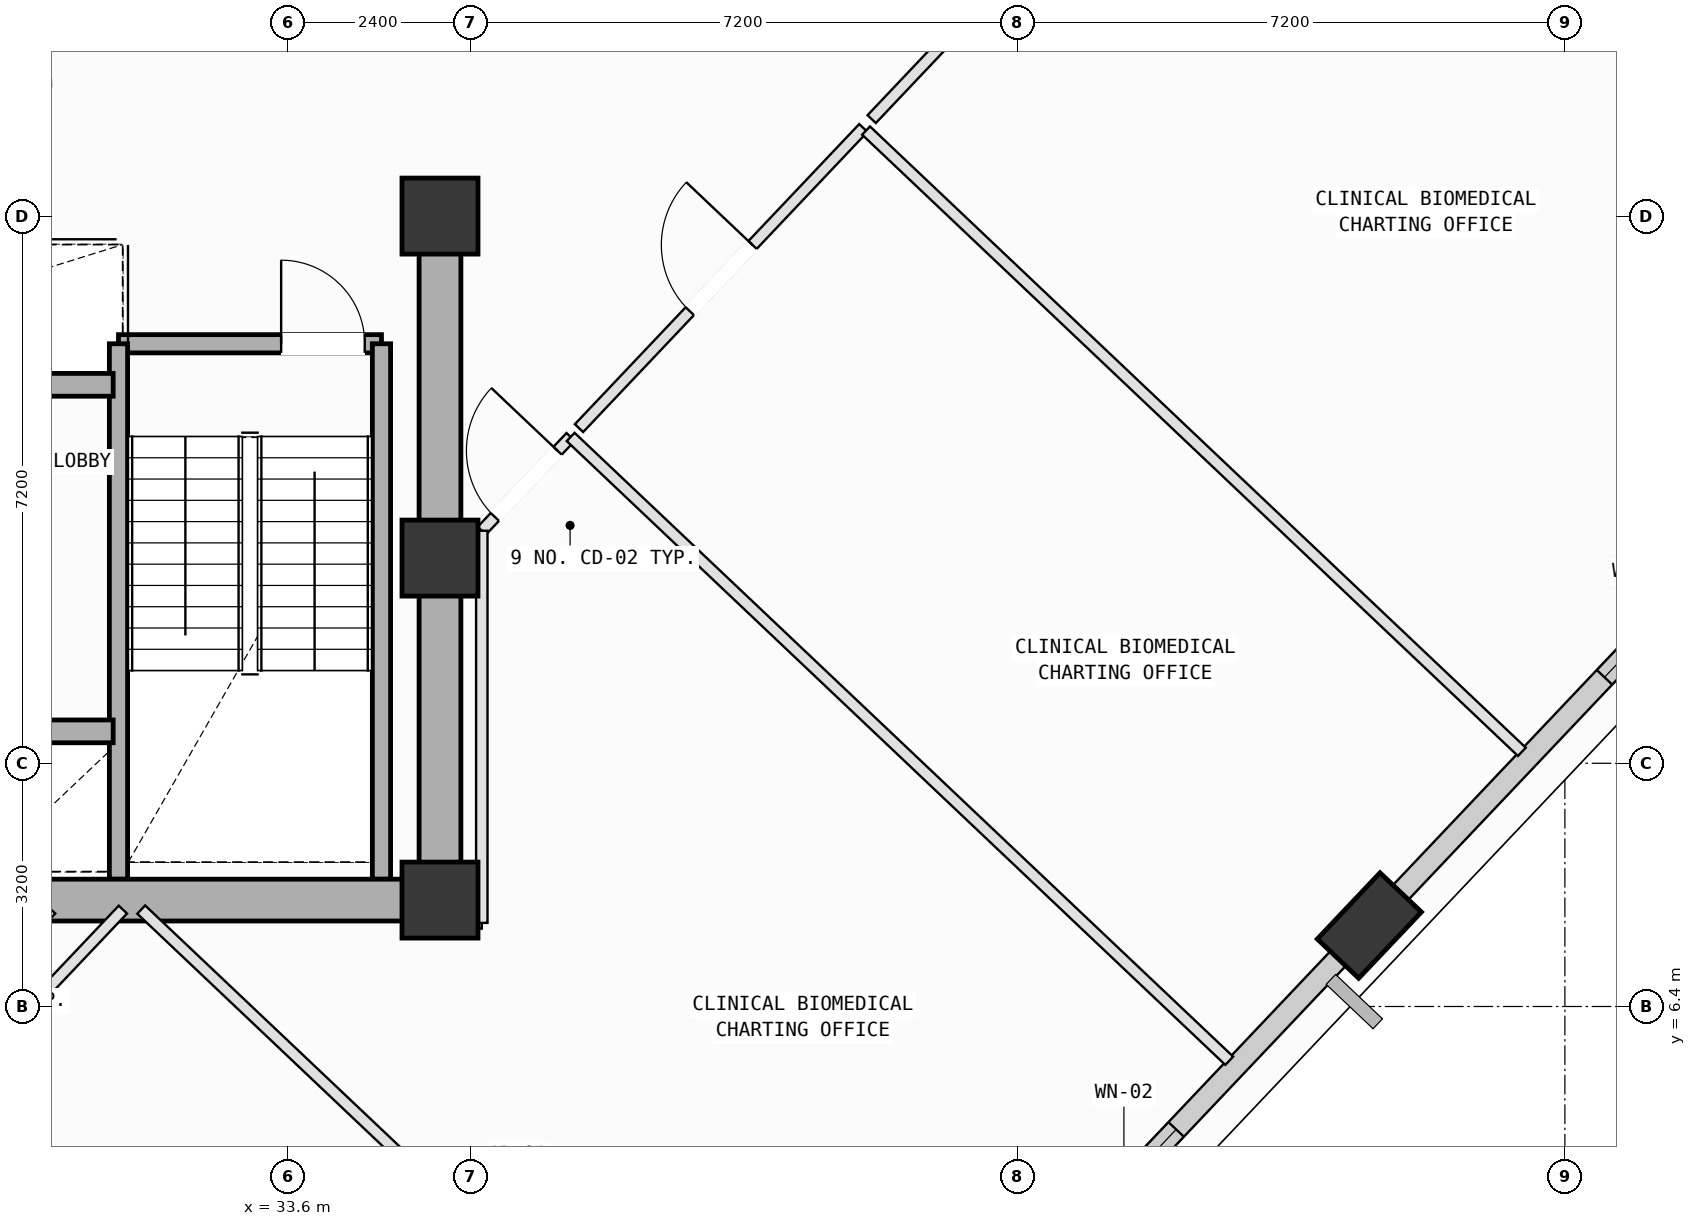
"""IFC4 building model, lengths in metres.
Left out: names, types, materials, properties, quantities, classifications, styles, units other than length and angle.
Written with IfcOpenShell. Run it as: python <this file> out.ifc"""

import sys

from ifc_helpers import new_model, si_unit, direction, frame, frame_2d, origin, origin_2d, place, context, subcontext, project, spatial, rectangle, extrude, element, fill, save


model = new_model("IFC4")
c1 = context("Model", 3, precision=1e-05, world=origin(), true_north=direction((0.0, 1.0)))
c2 = subcontext(c1, "Body", "Model", "MODEL_VIEW")
j1 = project(units=[si_unit("LENGTHUNIT", "METRE"), si_unit("PLANEANGLEUNIT", "RADIAN")], contexts=[c1])
p1 = place(None, origin())
s1 = spatial("IfcSite", under=j1, at=p1, CompositionType="ELEMENT")
p2 = place(p1, origin())
s2 = spatial("IfcBuilding", under=s1, at=p2, CompositionType="ELEMENT")
p3 = place(p2, frame((0.0, 0.0, 223.2)))
s3 = spatial("IfcBuildingStorey", under=s2, at=p3, CompositionType="ELEMENT", Elevation=223.2)
for number, where, z_axis, x_axis in (
    (1, (35.6, 7.8, 0.0), (0.0, 0.0, 1.0), (1.0, 0.0, 0.0)),
    (2, (35.6, 12.3, 0.0), (0.0, 0.0, 1.0), (1.0, 0.0, 0.0)),
    (3, (35.6, 16.8, 0.0), (0.0, 0.0, 1.0), (1.0, 0.0, 0.0)),
):
    element("IfcColumn", number, at=place(p3, frame(where, z_axis=z_axis, x_axis=x_axis)), inside=s3, PredefinedType="COLUMN", context=c2, shape_type="SweptSolid", body=[
        extrude(rectangle(XDim=1.0, YDim=1.0, at=origin_2d()), origin(), (0.0, 0.0, 1.0), 4.0),
    ])
p4 = place(p3, frame((47.827, 7.466, 0.002), z_axis=(0.071048146409, 0.059308170161, 0.995708140895), x_axis=(-0.995638946923, 0.064721230775, 0.067188166046)))
e4 = element("IfcColumn", 4, at=p4, inside=s3, PredefinedType="COLUMN", context=c2, shape_type="SweptSolid", body=[
    extrude(rectangle(XDim=1.2, YDim=0.75, at=origin_2d()), origin(), (0.0, 0.0, 1.0), 4.014),
])
p5 = place(p3, frame((30.075, 19.116, 0.002), z_axis=(0.023694224565, -0.014411951024, 0.999615365723), x_axis=(-0.867784125792, 0.496167464826, 0.027722876321)))
e5 = element("IfcColumn", 5, at=p5, inside=s3, PredefinedType="COLUMN", context=c2, shape_type="SweptSolid", body=[
    extrude(rectangle(XDim=1.2, YDim=0.75, at=origin_2d()), origin(), (0.0, 0.0, 1.0), 3.998),
])
p6 = place(p3, frame((47.681, 7.311, 0.0), z_axis=(0.0, 0.0, 1.0), x_axis=(-0.687738312463, -0.725958685856, 0.0)))
e6 = element("IfcWall", 6, at=p6, inside=s3, PredefinedType="SOLIDWALL", context=c2, shape_type="SweptSolid", body=[
    extrude(rectangle(XDim=6.413, YDim=0.28, at=frame_2d((3.207, 0.0))), origin(), (0.0, 0.0, 1.0), 3.265),
])
p7 = place(p6, frame((3.483, 0.0, 0.75)))
e7 = element("IfcOpeningElement", 7, at=p7, cuts=e6, PredefinedType="OPENING", context=c2, shape_type="SweptSolid", body=[
    extrude(rectangle(XDim=2.0, YDim=1.95, at=frame_2d((1.0, 0.975))), frame((0.0, 0.15, 0.0), z_axis=(0.0, -1.0, 0.0), x_axis=(1.0, 0.0, 0.0)), (0.0, 0.0, 1.0), 0.3),
])
p8 = place(p3, frame((52.633, 12.539, 0.0), z_axis=(0.0, 0.0, 1.0), x_axis=(-0.687718222847, -0.725977717264, 0.0)))
e8 = element("IfcWall", 8, at=p8, inside=s3, PredefinedType="SOLIDWALL", context=c2, shape_type="SweptSolid", body=[
    extrude(rectangle(XDim=6.407, YDim=0.28, at=frame_2d((3.203, 0.0))), origin(), (0.0, 0.0, 1.0), 3.265),
])
p9 = place(p8, frame((1.09, 0.0, 0.75)))
e9 = element("IfcOpeningElement", 9, at=p9, cuts=e8, PredefinedType="OPENING", context=c2, shape_type="SweptSolid", body=[
    extrude(rectangle(XDim=1.4, YDim=1.85, at=frame_2d((0.7, 0.925))), frame((0.0, 0.15, 0.0), z_axis=(0.0, -1.0, 0.0), x_axis=(1.0, 0.0, 0.0)), (0.0, 0.0, 1.0), 0.3),
])
p10 = place(p3, frame((31.37, 15.12, 0.0), z_axis=(0.0, 0.0, 1.0), x_axis=(1.0, 0.0, 0.0)))
e10 = element("IfcWall", 10, at=p10, inside=s3, PredefinedType="SOLIDWALL", context=c2, shape_type="SweptSolid", body=[
    extrude(rectangle(XDim=3.46, YDim=0.24, at=frame_2d((1.73, 0.0))), origin(), (0.0, 0.0, 1.0), 3.78),
])
p11 = place(p10, frame((2.14, 0.0, 0.0)))
e11 = element("IfcOpeningElement", 11, at=p11, cuts=e10, PredefinedType="OPENING", context=c2, shape_type="SweptSolid", body=[
    extrude(rectangle(XDim=1.1, YDim=2.15, at=frame_2d((0.55, 1.075))), frame((0.0, 0.13, 0.0), z_axis=(0.0, -1.0, 0.0), x_axis=(1.0, 0.0, 0.0)), (0.0, 0.0, 1.0), 0.26),
])
for number, where, z_axis, x_axis in (
    (12, (34.83, 15.12, 0.0), (0.0, 0.0, 1.0), (0.0, -1.0, 0.0)),
    (13, (31.37, 8.075, 0.0), (0.0, 0.0, 1.0), (0.0, 1.0, 0.0)),
):
    element("IfcWall", number, at=place(p3, frame(where, z_axis=z_axis, x_axis=x_axis)), inside=s3, PredefinedType="SOLIDWALL", context=c2, shape_type="SweptSolid", body=[
        extrude(rectangle(XDim=7.045, YDim=0.24, at=frame_2d((3.522, 0.0))), origin(), (0.0, 0.0, 1.0), 3.78),
    ])
p12 = place(p3, frame((24.8, 7.8, 0.0), z_axis=(0.0, 0.0, 1.0), x_axis=(1.0, 0.0, 0.0)))
e14 = element("IfcWall", 14, at=p12, inside=s3, PredefinedType="SHEAR", context=c2, shape_type="SweptSolid", body=[
    extrude(rectangle(XDim=10.8, YDim=0.55, at=frame_2d((5.4, 0.0))), origin(), (0.0, 0.0, 1.0), 3.78),
])
p13 = place(p3, frame((35.6, 7.8, 0.0), z_axis=(0.0, 0.0, 1.0), x_axis=(0.0, 1.0, 0.0)))
e15 = element("IfcWall", 15, at=p13, inside=s3, PredefinedType="SHEAR", context=c2, shape_type="SweptSolid", body=[
    extrude(rectangle(XDim=9.0, YDim=0.55, at=frame_2d((4.5, 0.0))), origin(), (0.0, 0.0, 1.0), 3.78),
])
p14 = place(p3, frame((29.6, 10.02, 0.0), z_axis=(0.0, 0.0, 1.0), x_axis=(1.0, 0.0, 0.0)))
e16 = element("IfcWall", 16, at=p14, inside=s3, PredefinedType="SOLIDWALL", context=c2, shape_type="SweptSolid", body=[
    extrude(rectangle(XDim=1.7, YDim=0.3, at=frame_2d((0.85, 0.0))), origin(), (0.0, 0.0, 1.0), 3.78),
])
p15 = place(p3, frame((25.85, 14.58, 0.0), z_axis=(0.0, 0.0, 1.0), x_axis=(1.0, 0.0, 0.0)))
e17 = element("IfcWall", 17, at=p15, inside=s3, PredefinedType="SOLIDWALL", context=c2, shape_type="SweptSolid", body=[
    extrude(rectangle(XDim=5.45, YDim=0.3, at=frame_2d((2.725, 0.0))), origin(), (0.0, 0.0, 1.0), 3.78),
])
p16 = place(p15, frame((0.34, 0.0, 0.0)))
e18 = element("IfcOpeningElement", 18, at=p16, cuts=e17, PredefinedType="OPENING", context=c2, shape_type="SweptSolid", body=[
    extrude(rectangle(XDim=1.12, YDim=2.15, at=frame_2d((0.56, 1.075))), frame((0.0, 0.16, 0.0), z_axis=(0.0, -1.0, 0.0), x_axis=(1.0, 0.0, 0.0)), (0.0, 0.0, 1.0), 0.32),
])
p17 = place(p15, frame((2.24, 0.0, 0.0)))
e19 = element("IfcOpeningElement", 19, at=p17, cuts=e17, PredefinedType="OPENING", context=c2, shape_type="SweptSolid", body=[
    extrude(rectangle(XDim=1.12, YDim=2.15, at=frame_2d((0.56, 1.075))), frame((0.0, 0.16, 0.0), z_axis=(0.0, -1.0, 0.0), x_axis=(1.0, 0.0, 0.0)), (0.0, 0.0, 1.0), 0.32),
])
p18 = place(p3, frame((27.801, 3.847, 0.0), z_axis=(0.0, 0.0, 1.0), x_axis=(0.687775466328, 0.725923486269, 0.0)))
e20 = element("IfcWall", 20, at=p18, inside=s3, PredefinedType="PARTITIONING", context=c2, shape_type="SweptSolid", body=[
    extrude(rectangle(XDim=5.273, YDim=0.15, at=frame_2d((2.637, 0.0))), origin(), (0.0, 0.0, 1.0), 3.78),
])
p19 = place(p3, frame((31.669, 7.675, 0.0), z_axis=(0.0, 0.0, 1.0), x_axis=(0.726018688267, -0.687674969943, 0.0)))
e21 = element("IfcWall", 21, at=p19, inside=s3, PredefinedType="PARTITIONING", context=c2, shape_type="SweptSolid", body=[
    extrude(rectangle(XDim=11.76, YDim=0.15, at=frame_2d((5.88, 0.0))), origin(), (0.0, 0.0, 1.0), 3.78),
])
p20 = place(p19, frame((5.679, 0.0, 0.0)))
e22 = element("IfcOpeningElement", 22, at=p20, cuts=e21, PredefinedType="OPENING", context=c2, shape_type="SweptSolid", body=[
    extrude(rectangle(XDim=0.86, YDim=2.06, at=frame_2d((0.43, 1.03))), frame((0.0, 0.085, 0.0), z_axis=(0.0, -1.0, 0.0), x_axis=(1.0, 0.0, 0.0)), (0.0, 0.0, 1.0), 0.17),
])
p21 = place(p3, frame((36.15, 12.66, 0.0), z_axis=(0.0, 0.0, 1.0), x_axis=(0.687748631245, 0.7259489102, 0.0)))
e23 = element("IfcWall", 23, at=p21, inside=s3, PredefinedType="PARTITIONING", context=c2, shape_type="SweptSolid", body=[
    extrude(rectangle(XDim=1.7, YDim=0.15, at=frame_2d((0.85, 0.0))), origin(), (0.0, 0.0, 1.0), 3.78),
])
p22 = place(p21, frame((0.25, 0.0, 0.0)))
e24 = element("IfcOpeningElement", 24, at=p22, cuts=e23, PredefinedType="OPENING", context=c2, shape_type="SweptSolid", body=[
    extrude(rectangle(XDim=1.2, YDim=2.15, at=frame_2d((0.6, 1.075))), frame((0.0, 0.085, 0.0), z_axis=(0.0, -1.0, 0.0), x_axis=(1.0, 0.0, 0.0)), (0.0, 0.0, 1.0), 0.17),
])
p23 = place(p3, frame((37.319, 13.894, 0.0), z_axis=(0.0, 0.0, 1.0), x_axis=(0.725983859035, -0.687711739336, 0.0)))
e25 = element("IfcWall", 25, at=p23, inside=s3, PredefinedType="PARTITIONING", context=c2, shape_type="SweptSolid", body=[
    extrude(rectangle(XDim=11.935, YDim=0.15, at=frame_2d((5.968, 0.0))), origin(), (0.0, 0.0, 1.0), 3.78),
])
p24 = place(p3, frame((35.6, 7.5, 0.0), z_axis=(0.0, 0.0, 1.0), x_axis=(1.0, 0.0, 0.0)))
e26 = element("IfcWall", 26, at=p24, inside=s3, PredefinedType="PARTITIONING", context=c2, shape_type="SweptSolid", body=[
    extrude(rectangle(XDim=0.55, YDim=0.15, at=frame_2d((0.275, 0.0))), origin(), (0.0, 0.0, 1.0), 3.78),
])
p25 = place(p3, frame((36.15, 7.5, 0.0), z_axis=(0.0, 0.0, 1.0), x_axis=(0.0, 1.0, 0.0)))
e27 = element("IfcWall", 27, at=p25, inside=s3, PredefinedType="PARTITIONING", context=c2, shape_type="SweptSolid", body=[
    extrude(rectangle(XDim=5.16, YDim=0.15, at=frame_2d((2.58, 0.0))), origin(), (0.0, 0.0, 1.0), 3.78),
])
p26 = place(p3, frame((37.429, 14.01, 0.0), z_axis=(0.0, 0.0, 1.0), x_axis=(0.687728463974, 0.725968015714, 0.0)))
e28 = element("IfcWall", 28, at=p26, inside=s3, PredefinedType="PARTITIONING", context=c2, shape_type="SweptSolid", body=[
    extrude(rectangle(XDim=5.44, YDim=0.15, at=frame_2d((2.72, 0.0))), origin(), (0.0, 0.0, 1.0), 3.78),
])
p27 = place(p26, frame((2.12, 0.0, 0.0)))
e29 = element("IfcOpeningElement", 29, at=p27, cuts=e28, PredefinedType="OPENING", context=c2, shape_type="SweptSolid", body=[
    extrude(rectangle(XDim=1.2, YDim=2.15, at=frame_2d((0.6, 1.075))), frame((0.0, 0.085, 0.0), z_axis=(0.0, -1.0, 0.0), x_axis=(1.0, 0.0, 0.0)), (0.0, 0.0, 1.0), 0.17),
])
p28 = place(p3, frame((41.206, 17.925, 0.0), z_axis=(0.0, 0.0, 1.0), x_axis=(0.725942427987, -0.687755473442, 0.0)))
e30 = element("IfcWall", 30, at=p28, inside=s3, PredefinedType="PARTITIONING", context=c2, shape_type="SweptSolid", body=[
    extrude(rectangle(XDim=11.885, YDim=0.15, at=frame_2d((5.943, 0.0))), origin(), (0.0, 0.0, 1.0), 3.78),
])
p29 = place(p3, frame((48.394, 7.729, 0.0), z_axis=(0.0, 0.0, 1.0), x_axis=(-0.688094375401, -0.725621203206, 0.0)))
e31 = element("IfcWall", 31, at=p29, inside=s3, PredefinedType="PARTITIONING", context=c2, shape_type="SweptSolid", body=[
    extrude(rectangle(XDim=0.794, YDim=0.15, at=frame_2d((0.397, 0.0))), origin(), (0.0, 0.0, 1.0), 3.265),
])
p30 = place(p3, frame((41.28, 18.076, 0.0), z_axis=(0.0, 0.0, 1.0), x_axis=(0.687723280908, 0.725972925732, 0.0)))
e32 = element("IfcWall", 32, at=p30, inside=s3, PredefinedType="PARTITIONING", context=c2, shape_type="SweptSolid", body=[
    extrude(rectangle(XDim=8.24, YDim=0.15, at=frame_2d((4.12, 0.0))), origin(), (0.0, 0.0, 1.0), 3.78),
])
p31 = place(p30, frame((3.52, 0.0, 0.0)))
e33 = element("IfcOpeningElement", 33, at=p31, cuts=e32, PredefinedType="OPENING", context=c2, shape_type="SweptSolid", body=[
    extrude(rectangle(XDim=1.2, YDim=2.15, at=frame_2d((0.6, 1.075))), frame((0.0, 0.085, 0.0), z_axis=(0.0, -1.0, 0.0), x_axis=(1.0, 0.0, 0.0)), (0.0, 0.0, 1.0), 0.17),
])
p32 = place(p3, frame((46.947, 24.058, 0.0), z_axis=(0.0, 0.0, 1.0), x_axis=(0.725954834058, -0.687742378298, 0.0)))
e34 = element("IfcWall", 34, at=p32, inside=s3, PredefinedType="PARTITIONING", context=c2, shape_type="SweptSolid", body=[
    extrude(rectangle(XDim=11.935, YDim=0.15, at=frame_2d((5.967, 0.0))), origin(), (0.0, 0.0, 1.0), 3.78),
])
p33 = place(p3, frame((30.484, 7.675, 0.0), z_axis=(0.0, 0.0, 1.0), x_axis=(-0.687675654544, -0.726018039823, 0.0)))
e35 = element("IfcWall", 35, at=p33, inside=s3, PredefinedType="PARTITIONING", context=c2, shape_type="SweptSolid", body=[
    extrude(rectangle(XDim=12.76, YDim=0.15, at=frame_2d((6.38, 0.0))), origin(), (0.0, 0.0, 1.0), 3.78),
])
p34 = place(p7, origin())
e36 = element("IfcWindow", 36, at=p34, inside=s3, PartitioningType="SINGLE_PANEL", PredefinedType="WINDOW", context=c2, shape_type="SweptSolid", body=[
    extrude(rectangle(XDim=2.0, YDim=1.95, at=frame_2d((1.0, 0.975))), frame((0.0, 0.03, 0.0), z_axis=(0.0, -1.0, 0.0), x_axis=(1.0, 0.0, 0.0)), (0.0, 0.0, 1.0), 0.06),
])
fill(e7, e36)
p35 = place(p9, origin())
e37 = element("IfcWindow", 37, at=p35, inside=s3, PartitioningType="SINGLE_PANEL", PredefinedType="WINDOW", context=c2, shape_type="SweptSolid", body=[
    extrude(rectangle(XDim=1.4, YDim=1.85, at=frame_2d((0.7, 0.925))), frame((0.0, 0.03, 0.0), z_axis=(0.0, -1.0, 0.0), x_axis=(1.0, 0.0, 0.0)), (0.0, 0.0, 1.0), 0.06),
])
fill(e9, e37)
p36 = place(p11, origin())
e38 = element("IfcDoor", 38, at=p36, inside=s3, OperationType="SINGLE_SWING_LEFT", PredefinedType="DOOR", context=c2, shape_type="SweptSolid", body=[
    extrude(rectangle(XDim=1.1, YDim=2.15, at=frame_2d((0.55, 1.075))), frame((0.0, 0.025, 0.0), z_axis=(0.0, -1.0, 0.0), x_axis=(1.0, 0.0, 0.0)), (0.0, 0.0, 1.0), 0.05),
])
fill(e11, e38)
p37 = place(p22, origin())
e39 = element("IfcDoor", 39, at=p37, inside=s3, OperationType="SINGLE_SWING_RIGHT", PredefinedType="DOOR", context=c2, shape_type="SweptSolid", body=[
    extrude(rectangle(XDim=1.2, YDim=2.15, at=frame_2d((0.6, 1.075))), frame((0.0, 0.025, 0.0), z_axis=(0.0, -1.0, 0.0), x_axis=(1.0, 0.0, 0.0)), (0.0, 0.0, 1.0), 0.05),
])
fill(e24, e39)
p38 = place(p27, origin())
e40 = element("IfcDoor", 40, at=p38, inside=s3, OperationType="SINGLE_SWING_RIGHT", PredefinedType="DOOR", context=c2, shape_type="SweptSolid", body=[
    extrude(rectangle(XDim=1.2, YDim=2.15, at=frame_2d((0.6, 1.075))), frame((0.0, 0.025, 0.0), z_axis=(0.0, -1.0, 0.0), x_axis=(1.0, 0.0, 0.0)), (0.0, 0.0, 1.0), 0.05),
])
fill(e29, e40)
save(model, sys.argv[1])
